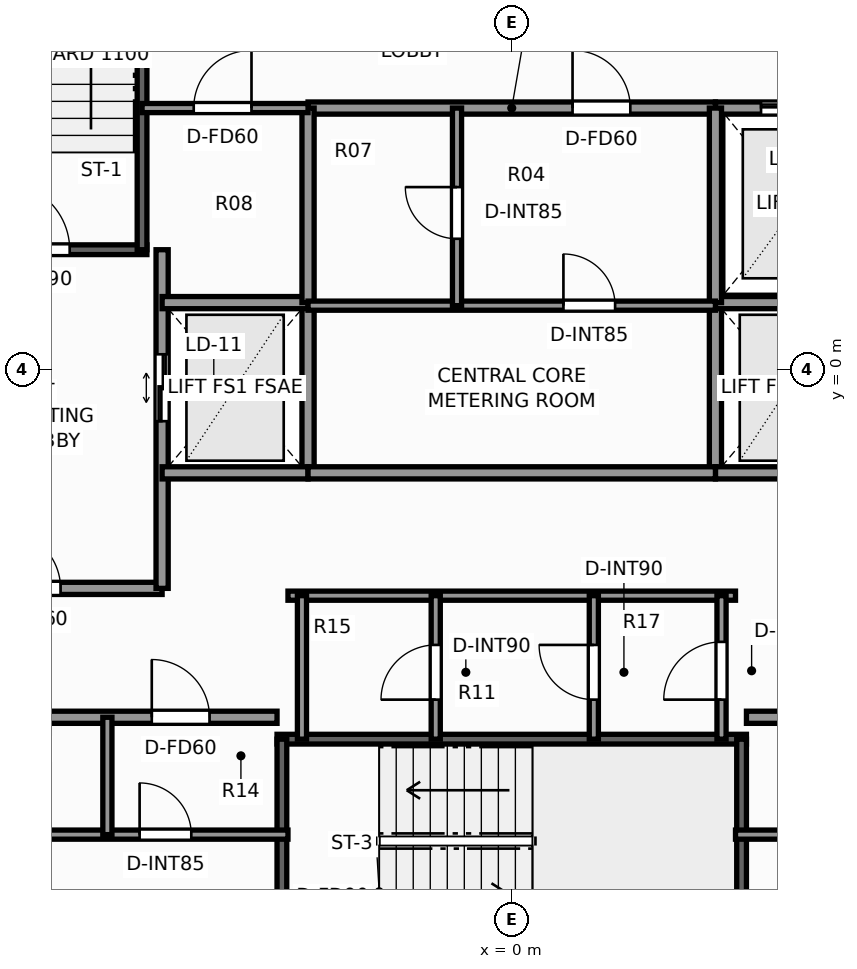
"""IFC4 building model, lengths in metres.
Left out: names, types, materials, properties, quantities, classifications, styles, units other than length and angle.
Written with IfcOpenShell. Run it as: python <this file> out.ifc"""

import sys

from ifc_helpers import new_model, si_unit, direction, frame, frame_2d, origin, place, context, subcontext, project, spatial, rectangle, extrude, element, fill, save


model = new_model("IFC4")
c1 = context("Model", 3, precision=1e-05, world=origin(), true_north=direction((0.0, 1.0)))
c2 = subcontext(c1, "Body", "Model", "MODEL_VIEW")
j1 = project(units=[si_unit("LENGTHUNIT", "METRE"), si_unit("PLANEANGLEUNIT", "RADIAN")], contexts=[c1])
p1 = place(None, origin())
s1 = spatial("IfcSite", under=j1, at=p1, CompositionType="ELEMENT")
p2 = place(p1, origin())
s2 = spatial("IfcBuilding", under=s1, at=p2, CompositionType="ELEMENT")
p3 = place(p2, frame((0.0, 0.0, 37.0)))
s3 = spatial("IfcBuildingStorey", under=s2, at=p3, CompositionType="ELEMENT", Elevation=37.0)
p4 = place(p3, frame((-9.52, 1.97, 0.0), z_axis=(0.0, 0.0, 1.0), x_axis=(1.0, 0.0, 0.0)))
e1 = element("IfcWall", 1, at=p4, inside=s3, PredefinedType="SHEAR", context=c2, shape_type="SweptSolid", body=[
    extrude(rectangle(XDim=3.52, YDim=0.16, at=frame_2d((1.76, 0.0))), origin(), (0.0, 0.0, 1.0), 3.3),
])
p5 = place(p4, frame((1.15, 0.0, 0.0)))
e2 = element("IfcOpeningElement", 2, at=p5, cuts=e1, PredefinedType="OPENING", context=c2, shape_type="SweptSolid", body=[
    extrude(rectangle(XDim=1.1, YDim=2.2, at=frame_2d((0.55, 1.1))), frame((0.0, 0.09, 0.0), z_axis=(0.0, -1.0, 0.0), x_axis=(1.0, 0.0, 0.0)), (0.0, 0.0, 1.0), 0.18),
])
p6 = place(p3, frame((-6.08, 1.97, 0.0), z_axis=(0.0, 0.0, 1.0), x_axis=(0.0, 1.0, 0.0)))
e3 = element("IfcWall", 3, at=p6, inside=s3, PredefinedType="SHEAR", context=c2, shape_type="SweptSolid", body=[
    extrude(rectangle(XDim=7.56, YDim=0.16, at=frame_2d((3.78, 0.0))), origin(), (0.0, 0.0, 1.0), 3.3),
])
p7 = place(p3, frame((-3.86, -6.08, 0.0), z_axis=(0.0, 0.0, 1.0), x_axis=(1.0, 0.0, 0.0)))
e4 = element("IfcWall", 4, at=p7, inside=s3, PredefinedType="SHEAR", context=c2, shape_type="SweptSolid", body=[
    extrude(rectangle(XDim=7.72, YDim=0.16, at=frame_2d((3.86, 0.0))), origin(), (0.0, 0.0, 1.0), 3.3),
])
for number, where, z_axis, x_axis in (
    (5, (-3.78, -9.43, 0.0), (0.0, 0.0, 1.0), (0.0, 1.0, 0.0)),
    (6, (3.78, -9.43, 0.0), (0.0, 0.0, 1.0), (0.0, 1.0, 0.0)),
):
    element("IfcWall", number, at=place(p3, frame(where, z_axis=z_axis, x_axis=x_axis)), inside=s3, PredefinedType="SHEAR", context=c2, shape_type="SweptSolid", body=[
        extrude(rectangle(XDim=3.35, YDim=0.16, at=frame_2d((1.675, 0.0))), origin(), (0.0, 0.0, 1.0), 3.3),
    ])
p8 = place(p3, frame((-9.52, -3.6, 0.0), z_axis=(0.0, 0.0, 1.0), x_axis=(1.0, 0.0, 0.0)))
e7 = element("IfcWall", 7, at=p8, inside=s3, PredefinedType="SOLIDWALL", context=c2, shape_type="SweptSolid", body=[
    extrude(rectangle(XDim=3.77, YDim=0.2, at=frame_2d((1.885, 0.0))), origin(), (0.0, 0.0, 1.0), 3.06),
])
p9 = place(p8, frame((1.15, 0.0, 0.0)))
e8 = element("IfcOpeningElement", 8, at=p9, cuts=e7, PredefinedType="OPENING", context=c2, shape_type="SweptSolid", body=[
    extrude(rectangle(XDim=0.95, YDim=2.06, at=frame_2d((0.475, 1.03))), frame((0.0, 0.11, 0.0), z_axis=(0.0, -1.0, 0.0), x_axis=(1.0, 0.0, 0.0)), (0.0, 0.0, 1.0), 0.22),
])
p10 = place(p3, frame((-5.75, -3.6, 0.0), z_axis=(0.0, 0.0, 1.0), x_axis=(0.0, 1.0, 0.0)))
e9 = element("IfcWall", 9, at=p10, inside=s3, PredefinedType="SOLIDWALL", context=c2, shape_type="SweptSolid", body=[
    extrude(rectangle(XDim=5.57, YDim=0.2, at=frame_2d((2.785, 0.0))), origin(), (0.0, 0.0, 1.0), 3.06),
])
p11 = place(p10, frame((2.75, 0.0, 0.0)))
e10 = element("IfcOpeningElement", 10, at=p11, cuts=e9, PredefinedType="OPENING", context=c2, shape_type="SweptSolid", body=[
    extrude(rectangle(XDim=1.1, YDim=2.2, at=frame_2d((0.55, 1.1))), frame((0.0, 0.11, 0.0), z_axis=(0.0, -1.0, 0.0), x_axis=(1.0, 0.0, 0.0)), (0.0, 0.0, 1.0), 0.22),
])
p12 = place(p3, frame((-3.35, -1.7, 0.0), z_axis=(0.0, 0.0, 1.0), x_axis=(0.0, 1.0, 0.0)))
e11 = element("IfcWall", 11, at=p12, inside=s3, PredefinedType="SOLIDWALL", context=c2, shape_type="SweptSolid", body=[
    extrude(rectangle(XDim=2.8, YDim=0.2, at=frame_2d((1.4, 0.0))), origin(), (0.0, 0.0, 1.0), 3.06),
])
for number, where, z_axis, x_axis in (
    (12, (-5.75, -1.7, 0.0), (0.0, 0.0, 1.0), (1.0, 0.0, 0.0)),
    (13, (-5.75, 1.1, 0.0), (0.0, 0.0, 1.0), (1.0, 0.0, 0.0)),
):
    element("IfcWall", number, at=place(p3, frame(where, z_axis=z_axis, x_axis=x_axis)), inside=s3, PredefinedType="SOLIDWALL", context=c2, shape_type="SweptSolid", body=[
        extrude(rectangle(XDim=2.4, YDim=0.2, at=frame_2d((1.2, 0.0))), origin(), (0.0, 0.0, 1.0), 3.06),
    ])
p13 = place(p3, frame((3.35, -1.7, 0.0), z_axis=(0.0, 0.0, 1.0), x_axis=(0.0, 1.0, 0.0)))
e14 = element("IfcWall", 14, at=p13, inside=s3, PredefinedType="SOLIDWALL", context=c2, shape_type="SweptSolid", body=[
    extrude(rectangle(XDim=2.8, YDim=0.2, at=frame_2d((1.4, 0.0))), origin(), (0.0, 0.0, 1.0), 3.06),
])
for number, where, z_axis, x_axis in (
    (15, (3.35, -1.7, 0.0), (0.0, 0.0, 1.0), (1.0, 0.0, 0.0)),
    (16, (3.35, 1.1, 0.0), (0.0, 0.0, 1.0), (1.0, 0.0, 0.0)),
):
    element("IfcWall", number, at=place(p3, frame(where, z_axis=z_axis, x_axis=x_axis)), inside=s3, PredefinedType="SOLIDWALL", context=c2, shape_type="SweptSolid", body=[
        extrude(rectangle(XDim=2.4, YDim=0.2, at=frame_2d((1.2, 0.0))), origin(), (0.0, 0.0, 1.0), 3.06),
    ])
p14 = place(p3, frame((3.35, 4.3, 0.0), z_axis=(0.0, 0.0, 1.0), x_axis=(1.0, 0.0, 0.0)))
e17 = element("IfcWall", 17, at=p14, inside=s3, PredefinedType="SOLIDWALL", context=c2, shape_type="SweptSolid", body=[
    extrude(rectangle(XDim=2.73, YDim=0.2, at=frame_2d((1.365, 0.0))), origin(), (0.0, 0.0, 1.0), 3.06),
])
p15 = place(p14, frame((0.75, 0.0, 0.0)))
e18 = element("IfcOpeningElement", 18, at=p15, cuts=e17, PredefinedType="OPENING", context=c2, shape_type="SweptSolid", body=[
    extrude(rectangle(XDim=1.2, YDim=2.25, at=frame_2d((0.6, 1.125))), frame((0.0, 0.11, 0.0), z_axis=(0.0, -1.0, 0.0), x_axis=(1.0, 0.0, 0.0)), (0.0, 0.0, 1.0), 0.22),
])
p16 = place(p3, frame((-9.52, -5.72, 0.0), z_axis=(0.0, 0.0, 1.0), x_axis=(1.0, 0.0, 0.0)))
e19 = element("IfcWall", 19, at=p16, inside=s3, PredefinedType="SOLIDWALL", context=c2, shape_type="SweptSolid", body=[
    extrude(rectangle(XDim=5.66, YDim=0.2, at=frame_2d((2.83, 0.0))), origin(), (0.0, 0.0, 1.0), 3.06),
])
p17 = place(p16, frame((3.6, 0.0, 0.0)))
e20 = element("IfcOpeningElement", 20, at=p17, cuts=e19, PredefinedType="OPENING", context=c2, shape_type="SweptSolid", body=[
    extrude(rectangle(XDim=0.95, YDim=2.06, at=frame_2d((0.475, 1.03))), frame((0.0, 0.11, 0.0), z_axis=(0.0, -1.0, 0.0), x_axis=(1.0, 0.0, 0.0)), (0.0, 0.0, 1.0), 0.22),
])
p18 = place(p16, frame((0.85, 0.0, 0.0)))
e21 = element("IfcOpeningElement", 21, at=p18, cuts=e19, PredefinedType="OPENING", context=c2, shape_type="SweptSolid", body=[
    extrude(rectangle(XDim=0.85, YDim=2.03, at=frame_2d((0.425, 1.015))), frame((0.0, 0.11, 0.0), z_axis=(0.0, -1.0, 0.0), x_axis=(1.0, 0.0, 0.0)), (0.0, 0.0, 1.0), 0.22),
])
p19 = place(p3, frame((-9.52, -7.65, 0.0), z_axis=(0.0, 0.0, 1.0), x_axis=(1.0, 0.0, 0.0)))
e22 = element("IfcWall", 22, at=p19, inside=s3, PredefinedType="PARTITIONING", context=c2, shape_type="SweptSolid", body=[
    extrude(rectangle(XDim=5.84, YDim=0.15, at=frame_2d((2.92, 0.0))), origin(), (0.0, 0.0, 1.0), 3.06),
])
p20 = place(p19, frame((3.4, 0.0, 0.0)))
e23 = element("IfcOpeningElement", 23, at=p20, cuts=e22, PredefinedType="OPENING", context=c2, shape_type="SweptSolid", body=[
    extrude(rectangle(XDim=0.85, YDim=2.03, at=frame_2d((0.425, 1.015))), frame((0.0, 0.085, 0.0), z_axis=(0.0, -1.0, 0.0), x_axis=(1.0, 0.0, 0.0)), (0.0, 0.0, 1.0), 0.17),
])
p21 = place(p3, frame((-6.65, -7.65, 0.0), z_axis=(0.0, 0.0, 1.0), x_axis=(0.0, 1.0, 0.0)))
e24 = element("IfcWall", 24, at=p21, inside=s3, PredefinedType="PARTITIONING", context=c2, shape_type="SweptSolid", body=[
    extrude(rectangle(XDim=1.93, YDim=0.15, at=frame_2d((0.965, 0.0))), origin(), (0.0, 0.0, 1.0), 3.06),
])
p22 = place(p3, frame((3.86, -5.72, 0.0), z_axis=(0.0, 0.0, 1.0), x_axis=(1.0, 0.0, 0.0)))
e25 = element("IfcWall", 25, at=p22, inside=s3, PredefinedType="SOLIDWALL", context=c2, shape_type="SweptSolid", body=[
    extrude(rectangle(XDim=5.66, YDim=0.2, at=frame_2d((2.83, 0.0))), origin(), (0.0, 0.0, 1.0), 3.06),
])
p23 = place(p22, frame((0.85, 0.0, 0.0)))
e26 = element("IfcOpeningElement", 26, at=p23, cuts=e25, PredefinedType="OPENING", context=c2, shape_type="SweptSolid", body=[
    extrude(rectangle(XDim=0.95, YDim=2.06, at=frame_2d((0.475, 1.03))), frame((0.0, 0.11, 0.0), z_axis=(0.0, -1.0, 0.0), x_axis=(1.0, 0.0, 0.0)), (0.0, 0.0, 1.0), 0.22),
])
p24 = place(p22, frame((3.6, 0.0, 0.0)))
e27 = element("IfcOpeningElement", 27, at=p24, cuts=e25, PredefinedType="OPENING", context=c2, shape_type="SweptSolid", body=[
    extrude(rectangle(XDim=0.85, YDim=2.03, at=frame_2d((0.425, 1.015))), frame((0.0, 0.11, 0.0), z_axis=(0.0, -1.0, 0.0), x_axis=(1.0, 0.0, 0.0)), (0.0, 0.0, 1.0), 0.22),
])
p25 = place(p3, frame((3.68, -7.65, 0.0), z_axis=(0.0, 0.0, 1.0), x_axis=(1.0, 0.0, 0.0)))
e28 = element("IfcWall", 28, at=p25, inside=s3, PredefinedType="PARTITIONING", context=c2, shape_type="SweptSolid", body=[
    extrude(rectangle(XDim=5.84, YDim=0.15, at=frame_2d((2.92, 0.0))), origin(), (0.0, 0.0, 1.0), 3.06),
])
p26 = place(p25, frame((0.95, 0.0, 0.0)))
e29 = element("IfcOpeningElement", 29, at=p26, cuts=e28, PredefinedType="OPENING", context=c2, shape_type="SweptSolid", body=[
    extrude(rectangle(XDim=0.85, YDim=2.03, at=frame_2d((0.425, 1.015))), frame((0.0, 0.085, 0.0), z_axis=(0.0, -1.0, 0.0), x_axis=(1.0, 0.0, 0.0)), (0.0, 0.0, 1.0), 0.17),
])
p27 = place(p3, frame((-3.35, 4.3, 0.0), z_axis=(0.0, 0.0, 1.0), x_axis=(1.0, 0.0, 0.0)))
e30 = element("IfcWall", 30, at=p27, inside=s3, PredefinedType="SOLIDWALL", context=c2, shape_type="SweptSolid", body=[
    extrude(rectangle(XDim=6.7, YDim=0.2, at=frame_2d((3.35, 0.0))), origin(), (0.0, 0.0, 1.0), 3.06),
])
p28 = place(p27, frame((4.35, 0.0, 0.0)))
e31 = element("IfcOpeningElement", 31, at=p28, cuts=e30, PredefinedType="OPENING", context=c2, shape_type="SweptSolid", body=[
    extrude(rectangle(XDim=0.95, YDim=2.06, at=frame_2d((0.475, 1.03))), frame((0.0, 0.11, 0.0), z_axis=(0.0, -1.0, 0.0), x_axis=(1.0, 0.0, 0.0)), (0.0, 0.0, 1.0), 0.22),
])
p29 = place(p3, frame((-3.35, -1.7, 0.0), z_axis=(0.0, 0.0, 1.0), x_axis=(1.0, 0.0, 0.0)))
e32 = element("IfcWall", 32, at=p29, inside=s3, PredefinedType="SOLIDWALL", context=c2, shape_type="SweptSolid", body=[
    extrude(rectangle(XDim=6.7, YDim=0.2, at=frame_2d((3.35, 0.0))), origin(), (0.0, 0.0, 1.0), 3.06),
])
for number, where, z_axis, x_axis in (
    (33, (-3.35, 1.1, 0.0), (0.0, 0.0, 1.0), (0.0, 1.0, 0.0)),
    (34, (3.35, 1.1, 0.0), (0.0, 0.0, 1.0), (0.0, 1.0, 0.0)),
):
    element("IfcWall", number, at=place(p3, frame(where, z_axis=z_axis, x_axis=x_axis)), inside=s3, PredefinedType="SOLIDWALL", context=c2, shape_type="SweptSolid", body=[
        extrude(rectangle(XDim=3.2, YDim=0.2, at=frame_2d((1.6, 0.0))), origin(), (0.0, 0.0, 1.0), 3.06),
    ])
p30 = place(p3, frame((-3.35, 1.05, 0.0), z_axis=(0.0, 0.0, 1.0), x_axis=(1.0, 0.0, 0.0)))
e35 = element("IfcWall", 35, at=p30, inside=s3, PredefinedType="PARTITIONING", context=c2, shape_type="SweptSolid", body=[
    extrude(rectangle(XDim=6.7, YDim=0.15, at=frame_2d((3.35, 0.0))), origin(), (0.0, 0.0, 1.0), 3.06),
])
p31 = place(p30, frame((4.2, 0.0, 0.0)))
e36 = element("IfcOpeningElement", 36, at=p31, cuts=e35, PredefinedType="OPENING", context=c2, shape_type="SweptSolid", body=[
    extrude(rectangle(XDim=0.85, YDim=2.03, at=frame_2d((0.425, 1.015))), frame((0.0, 0.085, 0.0), z_axis=(0.0, -1.0, 0.0), x_axis=(1.0, 0.0, 0.0)), (0.0, 0.0, 1.0), 0.17),
])
p32 = place(p3, frame((-0.9, 1.05, 0.0), z_axis=(0.0, 0.0, 1.0), x_axis=(0.0, 1.0, 0.0)))
e37 = element("IfcWall", 37, at=p32, inside=s3, PredefinedType="PARTITIONING", context=c2, shape_type="SweptSolid", body=[
    extrude(rectangle(XDim=3.25, YDim=0.15, at=frame_2d((1.625, 0.0))), origin(), (0.0, 0.0, 1.0), 3.06),
])
p33 = place(p32, frame((1.1, 0.0, 0.0)))
e38 = element("IfcOpeningElement", 38, at=p33, cuts=e37, PredefinedType="OPENING", context=c2, shape_type="SweptSolid", body=[
    extrude(rectangle(XDim=0.85, YDim=2.03, at=frame_2d((0.425, 1.015))), frame((0.0, 0.085, 0.0), z_axis=(0.0, -1.0, 0.0), x_axis=(1.0, 0.0, 0.0)), (0.0, 0.0, 1.0), 0.17),
])
p34 = place(p3, frame((-3.68, -3.72, 0.0), z_axis=(0.0, 0.0, 1.0), x_axis=(1.0, 0.0, 0.0)))
e39 = element("IfcWall", 39, at=p34, inside=s3, PredefinedType="PARTITIONING", context=c2, shape_type="SweptSolid", body=[
    extrude(rectangle(XDim=7.36, YDim=0.15, at=frame_2d((3.68, 0.0))), origin(), (0.0, 0.0, 1.0), 3.06),
])
p35 = place(p3, frame((3.45, -6.08, 0.0), z_axis=(0.0, 0.0, 1.0), x_axis=(0.0, 1.0, 0.0)))
e40 = element("IfcWall", 40, at=p35, inside=s3, PredefinedType="PARTITIONING", context=c2, shape_type="SweptSolid", body=[
    extrude(rectangle(XDim=2.36, YDim=0.15, at=frame_2d((1.18, 0.0))), origin(), (0.0, 0.0, 1.0), 3.06),
])
p36 = place(p35, frame((0.65, 0.0, 0.0)))
e41 = element("IfcOpeningElement", 41, at=p36, cuts=e40, PredefinedType="OPENING", context=c2, shape_type="SweptSolid", body=[
    extrude(rectangle(XDim=0.95, YDim=2.06, at=frame_2d((0.475, 1.03))), frame((0.0, 0.085, 0.0), z_axis=(0.0, -1.0, 0.0), x_axis=(1.0, 0.0, 0.0)), (0.0, 0.0, 1.0), 0.17),
])
p37 = place(p3, frame((-3.45, -6.08, 0.0), z_axis=(0.0, 0.0, 1.0), x_axis=(0.0, 1.0, 0.0)))
e42 = element("IfcWall", 42, at=p37, inside=s3, PredefinedType="PARTITIONING", context=c2, shape_type="SweptSolid", body=[
    extrude(rectangle(XDim=2.36, YDim=0.15, at=frame_2d((1.18, 0.0))), origin(), (0.0, 0.0, 1.0), 3.06),
])
p38 = place(p3, frame((1.35, -6.08, 0.0), z_axis=(0.0, 0.0, 1.0), x_axis=(0.0, 1.0, 0.0)))
e43 = element("IfcWall", 43, at=p38, inside=s3, PredefinedType="PARTITIONING", context=c2, shape_type="SweptSolid", body=[
    extrude(rectangle(XDim=2.36, YDim=0.15, at=frame_2d((1.18, 0.0))), origin(), (0.0, 0.0, 1.0), 3.06),
])
p39 = place(p38, frame((0.65, 0.0, 0.0)))
e44 = element("IfcOpeningElement", 44, at=p39, cuts=e43, PredefinedType="OPENING", context=c2, shape_type="SweptSolid", body=[
    extrude(rectangle(XDim=0.9, YDim=2.06, at=frame_2d((0.45, 1.03))), frame((0.0, 0.085, 0.0), z_axis=(0.0, -1.0, 0.0), x_axis=(1.0, 0.0, 0.0)), (0.0, 0.0, 1.0), 0.17),
])
p40 = place(p3, frame((-1.25, -6.08, 0.0), z_axis=(0.0, 0.0, 1.0), x_axis=(0.0, 1.0, 0.0)))
e45 = element("IfcWall", 45, at=p40, inside=s3, PredefinedType="PARTITIONING", context=c2, shape_type="SweptSolid", body=[
    extrude(rectangle(XDim=2.36, YDim=0.15, at=frame_2d((1.18, 0.0))), origin(), (0.0, 0.0, 1.0), 3.06),
])
p41 = place(p40, frame((0.65, 0.0, 0.0)))
e46 = element("IfcOpeningElement", 46, at=p41, cuts=e45, PredefinedType="OPENING", context=c2, shape_type="SweptSolid", body=[
    extrude(rectangle(XDim=0.9, YDim=2.06, at=frame_2d((0.45, 1.03))), frame((0.0, 0.085, 0.0), z_axis=(0.0, -1.0, 0.0), x_axis=(1.0, 0.0, 0.0)), (0.0, 0.0, 1.0), 0.17),
])
p42 = place(p3, frame((-6.08, 4.3, 0.0), z_axis=(0.0, 0.0, 1.0), x_axis=(1.0, 0.0, 0.0)))
e47 = element("IfcWall", 47, at=p42, inside=s3, PredefinedType="PARTITIONING", context=c2, shape_type="SweptSolid", body=[
    extrude(rectangle(XDim=2.73, YDim=0.15, at=frame_2d((1.365, 0.0))), origin(), (0.0, 0.0, 1.0), 3.06),
])
p43 = place(p42, frame((0.85, 0.0, 0.0)))
e48 = element("IfcOpeningElement", 48, at=p43, cuts=e47, PredefinedType="OPENING", context=c2, shape_type="SweptSolid", body=[
    extrude(rectangle(XDim=0.95, YDim=2.06, at=frame_2d((0.475, 1.03))), frame((0.0, 0.085, 0.0), z_axis=(0.0, -1.0, 0.0), x_axis=(1.0, 0.0, 0.0)), (0.0, 0.0, 1.0), 0.17),
])
p44 = place(p5, origin())
e49 = element("IfcDoor", 49, at=p44, inside=s3, OperationType="SINGLE_SWING_LEFT", PredefinedType="DOOR", context=c2, shape_type="SweptSolid", body=[
    extrude(rectangle(XDim=1.1, YDim=2.2, at=frame_2d((0.55, 1.1))), frame((0.0, 0.025, 0.0), z_axis=(0.0, -1.0, 0.0), x_axis=(1.0, 0.0, 0.0)), (0.0, 0.0, 1.0), 0.05),
])
fill(e2, e49)
p45 = place(p11, origin())
e50 = element("IfcDoor", 50, at=p45, inside=s3, OperationType="DOUBLE_DOOR_SLIDING", PredefinedType="DOOR", context=c2, shape_type="SweptSolid", body=[
    extrude(rectangle(XDim=1.1, YDim=2.2, at=frame_2d((0.55, 1.1))), frame((0.0, 0.025, 0.0), z_axis=(0.0, -1.0, 0.0), x_axis=(1.0, 0.0, 0.0)), (0.0, 0.0, 1.0), 0.05),
])
fill(e10, e50)
p46 = place(p15, origin())
e51 = element("IfcDoor", 51, at=p46, inside=s3, OperationType="DOUBLE_DOOR_SLIDING", PredefinedType="DOOR", context=c2, shape_type="SweptSolid", body=[
    extrude(rectangle(XDim=1.2, YDim=2.25, at=frame_2d((0.6, 1.125))), frame((0.0, 0.025, 0.0), z_axis=(0.0, -1.0, 0.0), x_axis=(1.0, 0.0, 0.0)), (0.0, 0.0, 1.0), 0.05),
])
fill(e18, e51)
p47 = place(p17, origin())
e52 = element("IfcDoor", 52, at=p47, inside=s3, OperationType="SINGLE_SWING_LEFT", PredefinedType="DOOR", context=c2, shape_type="SweptSolid", body=[
    extrude(rectangle(XDim=0.95, YDim=2.06, at=frame_2d((0.475, 1.03))), frame((0.0, 0.025, 0.0), z_axis=(0.0, -1.0, 0.0), x_axis=(1.0, 0.0, 0.0)), (0.0, 0.0, 1.0), 0.05),
])
fill(e20, e52)
p48 = place(p20, origin())
e53 = element("IfcDoor", 53, at=p48, inside=s3, OperationType="SINGLE_SWING_LEFT", PredefinedType="DOOR", context=c2, shape_type="SweptSolid", body=[
    extrude(rectangle(XDim=0.85, YDim=2.03, at=frame_2d((0.425, 1.015))), frame((0.0, 0.025, 0.0), z_axis=(0.0, -1.0, 0.0), x_axis=(1.0, 0.0, 0.0)), (0.0, 0.0, 1.0), 0.05),
])
fill(e23, e53)
p49 = place(p9, origin())
e54 = element("IfcDoor", 54, at=p49, inside=s3, OperationType="SINGLE_SWING_LEFT", PredefinedType="DOOR", context=c2, shape_type="SweptSolid", body=[
    extrude(rectangle(XDim=0.95, YDim=2.06, at=frame_2d((0.475, 1.03))), frame((0.0, 0.025, 0.0), z_axis=(0.0, -1.0, 0.0), x_axis=(1.0, 0.0, 0.0)), (0.0, 0.0, 1.0), 0.05),
])
fill(e8, e54)
p50 = place(p28, origin())
e55 = element("IfcDoor", 55, at=p50, inside=s3, OperationType="SINGLE_SWING_LEFT", PredefinedType="DOOR", context=c2, shape_type="SweptSolid", body=[
    extrude(rectangle(XDim=0.95, YDim=2.06, at=frame_2d((0.475, 1.03))), frame((0.0, 0.025, 0.0), z_axis=(0.0, -1.0, 0.0), x_axis=(1.0, 0.0, 0.0)), (0.0, 0.0, 1.0), 0.05),
])
fill(e31, e55)
p51 = place(p31, origin())
e56 = element("IfcDoor", 56, at=p51, inside=s3, OperationType="SINGLE_SWING_LEFT", PredefinedType="DOOR", context=c2, shape_type="SweptSolid", body=[
    extrude(rectangle(XDim=0.85, YDim=2.03, at=frame_2d((0.425, 1.015))), frame((0.0, 0.025, 0.0), z_axis=(0.0, -1.0, 0.0), x_axis=(1.0, 0.0, 0.0)), (0.0, 0.0, 1.0), 0.05),
])
fill(e36, e56)
p52 = place(p33, origin())
e57 = element("IfcDoor", 57, at=p52, inside=s3, OperationType="SINGLE_SWING_RIGHT", PredefinedType="DOOR", context=c2, shape_type="SweptSolid", body=[
    extrude(rectangle(XDim=0.85, YDim=2.03, at=frame_2d((0.425, 1.015))), frame((0.0, 0.025, 0.0), z_axis=(0.0, -1.0, 0.0), x_axis=(1.0, 0.0, 0.0)), (0.0, 0.0, 1.0), 0.05),
])
fill(e38, e57)
p53 = place(p36, origin())
e58 = element("IfcDoor", 58, at=p53, inside=s3, OperationType="SINGLE_SWING_LEFT", PredefinedType="DOOR", context=c2, shape_type="SweptSolid", body=[
    extrude(rectangle(XDim=0.95, YDim=2.06, at=frame_2d((0.475, 1.03))), frame((0.0, 0.025, 0.0), z_axis=(0.0, -1.0, 0.0), x_axis=(1.0, 0.0, 0.0)), (0.0, 0.0, 1.0), 0.05),
])
fill(e41, e58)
p54 = place(p39, origin())
e59 = element("IfcDoor", 59, at=p54, inside=s3, OperationType="SINGLE_SWING_RIGHT", PredefinedType="DOOR", context=c2, shape_type="SweptSolid", body=[
    extrude(rectangle(XDim=0.9, YDim=2.06, at=frame_2d((0.45, 1.03))), frame((0.0, 0.025, 0.0), z_axis=(0.0, -1.0, 0.0), x_axis=(1.0, 0.0, 0.0)), (0.0, 0.0, 1.0), 0.05),
])
fill(e44, e59)
p55 = place(p41, origin())
e60 = element("IfcDoor", 60, at=p55, inside=s3, OperationType="SINGLE_SWING_LEFT", PredefinedType="DOOR", context=c2, shape_type="SweptSolid", body=[
    extrude(rectangle(XDim=0.9, YDim=2.06, at=frame_2d((0.45, 1.03))), frame((0.0, 0.025, 0.0), z_axis=(0.0, -1.0, 0.0), x_axis=(1.0, 0.0, 0.0)), (0.0, 0.0, 1.0), 0.05),
])
fill(e46, e60)
p56 = place(p43, origin())
e61 = element("IfcDoor", 61, at=p56, inside=s3, OperationType="SINGLE_SWING_RIGHT", PredefinedType="DOOR", context=c2, shape_type="SweptSolid", body=[
    extrude(rectangle(XDim=0.95, YDim=2.06, at=frame_2d((0.475, 1.03))), frame((0.0, 0.025, 0.0), z_axis=(0.0, -1.0, 0.0), x_axis=(1.0, 0.0, 0.0)), (0.0, 0.0, 1.0), 0.05),
])
fill(e48, e61)
save(model, sys.argv[1])
